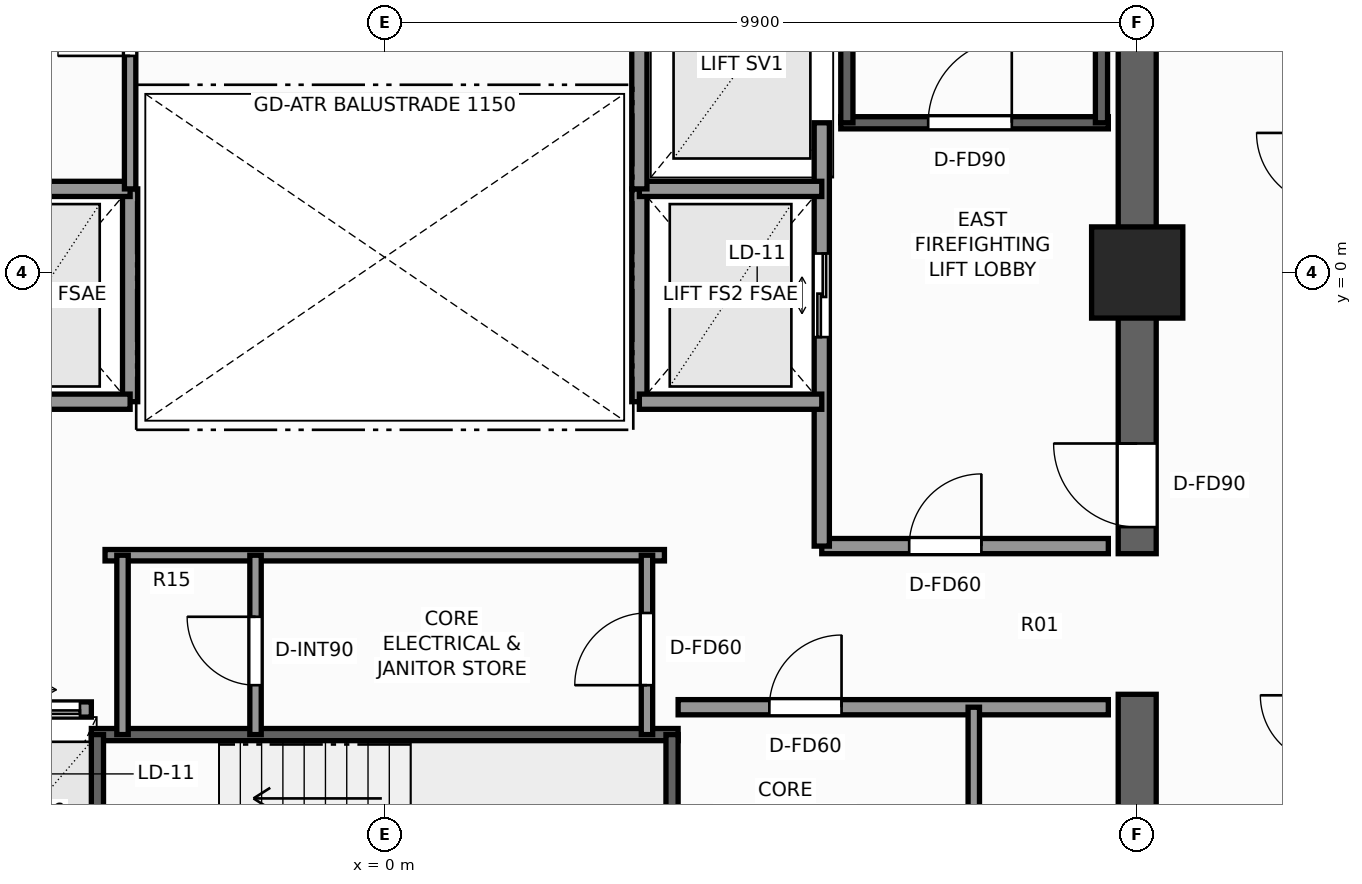
"""IFC4 building model, lengths in metres.
Left out: names, types, materials, properties, quantities, classifications, styles, units other than length and angle.
Written with IfcOpenShell. Run it as: python <this file> out.ifc"""

import sys

from ifc_helpers import new_model, si_unit, direction, frame, frame_2d, origin, origin_2d, place, context, subcontext, project, spatial, rectangle, extrude, element, fill, save


model = new_model("IFC4")
c1 = context("Model", 3, precision=1e-05, world=origin(), true_north=direction((0.0, 1.0)))
c2 = subcontext(c1, "Body", "Model", "MODEL_VIEW")
j1 = project(units=[si_unit("LENGTHUNIT", "METRE"), si_unit("PLANEANGLEUNIT", "RADIAN")], contexts=[c1])
p1 = place(None, origin())
s1 = spatial("IfcSite", under=j1, at=p1, CompositionType="ELEMENT")
p2 = place(p1, origin())
s2 = spatial("IfcBuilding", under=s1, at=p2, CompositionType="ELEMENT")
p3 = place(p2, frame((0.0, 0.0, 128.3)))
s3 = spatial("IfcBuildingStorey", under=s2, at=p3, CompositionType="ELEMENT", Elevation=128.3)
p4 = place(p3, frame((9.9, -9.65, 0.0), z_axis=(0.0, 0.0, 1.0), x_axis=(0.0, 1.0, 0.0)))
e1 = element("IfcWall", 1, at=p4, inside=s3, PredefinedType="SHEAR", context=c2, shape_type="SweptSolid", body=[
    extrude(rectangle(XDim=4.1, YDim=0.5, at=frame_2d((2.05, 0.0))), origin(), (0.0, 0.0, 1.0), 3.3),
])
p5 = place(p3, frame((9.9, -3.7, 0.0), z_axis=(0.0, 0.0, 1.0), x_axis=(0.0, 1.0, 0.0)))
e2 = element("IfcWall", 2, at=p5, inside=s3, PredefinedType="SHEAR", context=c2, shape_type="SweptSolid", body=[
    extrude(rectangle(XDim=13.35, YDim=0.5, at=frame_2d((6.675, 0.0))), origin(), (0.0, 0.0, 1.0), 3.3),
])
p6 = place(p5, frame((0.35, 0.0, 0.0)))
e3 = element("IfcOpeningElement", 3, at=p6, cuts=e2, PredefinedType="OPENING", context=c2, shape_type="SweptSolid", body=[
    extrude(rectangle(XDim=1.1, YDim=2.2, at=frame_2d((0.55, 1.1))), frame((0.0, 0.26, 0.0), z_axis=(0.0, -1.0, 0.0), x_axis=(1.0, 0.0, 0.0)), (0.0, 0.0, 1.0), 0.52),
])
p7 = place(p3, frame((9.9, 0.0, 0.0), z_axis=(0.0, 0.0, 1.0), x_axis=(1.0, 0.0, 0.0)))
e4 = element("IfcColumn", 4, at=p7, inside=s3, PredefinedType="COLUMN", context=c2, shape_type="SweptSolid", body=[
    extrude(rectangle(XDim=1.2, YDim=1.2, at=origin_2d()), origin(), (0.0, 0.0, 1.0), 3.3),
])
p8 = place(p3, frame((6.0, 1.97, 0.0), z_axis=(0.0, 0.0, 1.0), x_axis=(1.0, 0.0, 0.0)))
e5 = element("IfcWall", 5, at=p8, inside=s3, PredefinedType="SHEAR", context=c2, shape_type="SweptSolid", body=[
    extrude(rectangle(XDim=3.52, YDim=0.16, at=frame_2d((1.76, 0.0))), origin(), (0.0, 0.0, 1.0), 3.3),
])
p9 = place(p8, frame((1.15, 0.0, 0.0)))
e6 = element("IfcOpeningElement", 6, at=p9, cuts=e5, PredefinedType="OPENING", context=c2, shape_type="SweptSolid", body=[
    extrude(rectangle(XDim=1.1, YDim=2.2, at=frame_2d((0.55, 1.1))), frame((0.0, 0.09, 0.0), z_axis=(0.0, -1.0, 0.0), x_axis=(1.0, 0.0, 0.0)), (0.0, 0.0, 1.0), 0.18),
])
for number, where, z_axis, x_axis in (
    (7, (6.08, 1.97, 0.0), (0.0, 0.0, 1.0), (0.0, 1.0, 0.0)),
    (8, (9.43, 1.97, 0.0), (0.0, 0.0, 1.0), (0.0, 1.0, 0.0)),
):
    element("IfcWall", number, at=place(p3, frame(where, z_axis=z_axis, x_axis=x_axis)), inside=s3, PredefinedType="SHEAR", context=c2, shape_type="SweptSolid", body=[
        extrude(rectangle(XDim=7.56, YDim=0.16, at=frame_2d((3.78, 0.0))), origin(), (0.0, 0.0, 1.0), 3.3),
    ])
p10 = place(p3, frame((-3.86, -6.08, 0.0), z_axis=(0.0, 0.0, 1.0), x_axis=(1.0, 0.0, 0.0)))
e9 = element("IfcWall", 9, at=p10, inside=s3, PredefinedType="SHEAR", context=c2, shape_type="SweptSolid", body=[
    extrude(rectangle(XDim=7.72, YDim=0.16, at=frame_2d((3.86, 0.0))), origin(), (0.0, 0.0, 1.0), 3.3),
])
for number, where, z_axis, x_axis in (
    (10, (-3.78, -9.43, 0.0), (0.0, 0.0, 1.0), (0.0, 1.0, 0.0)),
    (11, (3.78, -9.43, 0.0), (0.0, 0.0, 1.0), (0.0, 1.0, 0.0)),
):
    element("IfcWall", number, at=place(p3, frame(where, z_axis=z_axis, x_axis=x_axis)), inside=s3, PredefinedType="SHEAR", context=c2, shape_type="SweptSolid", body=[
        extrude(rectangle(XDim=3.35, YDim=0.16, at=frame_2d((1.675, 0.0))), origin(), (0.0, 0.0, 1.0), 3.3),
    ])
p11 = place(p3, frame((-3.35, -1.7, 0.0), z_axis=(0.0, 0.0, 1.0), x_axis=(0.0, 1.0, 0.0)))
e12 = element("IfcWall", 12, at=p11, inside=s3, PredefinedType="SOLIDWALL", context=c2, shape_type="SweptSolid", body=[
    extrude(rectangle(XDim=2.8, YDim=0.2, at=frame_2d((1.4, 0.0))), origin(), (0.0, 0.0, 1.0), 2.735),
])
for number, where, z_axis, x_axis in (
    (13, (-5.75, -1.7, 0.0), (0.0, 0.0, 1.0), (1.0, 0.0, 0.0)),
    (14, (-5.75, 1.1, 0.0), (0.0, 0.0, 1.0), (1.0, 0.0, 0.0)),
):
    element("IfcWall", number, at=place(p3, frame(where, z_axis=z_axis, x_axis=x_axis)), inside=s3, PredefinedType="SOLIDWALL", context=c2, shape_type="SweptSolid", body=[
        extrude(rectangle(XDim=2.4, YDim=0.2, at=frame_2d((1.2, 0.0))), origin(), (0.0, 0.0, 1.0), 3.1),
    ])
p12 = place(p3, frame((5.75, -3.6, 0.0), z_axis=(0.0, 0.0, 1.0), x_axis=(1.0, 0.0, 0.0)))
e15 = element("IfcWall", 15, at=p12, inside=s3, PredefinedType="SOLIDWALL", context=c2, shape_type="SweptSolid", body=[
    extrude(rectangle(XDim=3.77, YDim=0.2, at=frame_2d((1.885, 0.0))), origin(), (0.0, 0.0, 1.0), 3.1),
])
p13 = place(p12, frame((1.15, 0.0, 0.0)))
e16 = element("IfcOpeningElement", 16, at=p13, cuts=e15, PredefinedType="OPENING", context=c2, shape_type="SweptSolid", body=[
    extrude(rectangle(XDim=0.95, YDim=2.06, at=frame_2d((0.475, 1.03))), frame((0.0, 0.11, 0.0), z_axis=(0.0, -1.0, 0.0), x_axis=(1.0, 0.0, 0.0)), (0.0, 0.0, 1.0), 0.22),
])
p14 = place(p3, frame((5.75, -3.6, 0.0), z_axis=(0.0, 0.0, 1.0), x_axis=(0.0, 1.0, 0.0)))
e17 = element("IfcWall", 17, at=p14, inside=s3, PredefinedType="SOLIDWALL", context=c2, shape_type="SweptSolid", body=[
    extrude(rectangle(XDim=5.57, YDim=0.2, at=frame_2d((2.785, 0.0))), origin(), (0.0, 0.0, 1.0), 2.735),
])
p15 = place(p14, frame((2.75, 0.0, 0.0)))
e18 = element("IfcOpeningElement", 18, at=p15, cuts=e17, PredefinedType="OPENING", context=c2, shape_type="SweptSolid", body=[
    extrude(rectangle(XDim=1.1, YDim=2.2, at=frame_2d((0.55, 1.1))), frame((0.0, 0.11, 0.0), z_axis=(0.0, -1.0, 0.0), x_axis=(1.0, 0.0, 0.0)), (0.0, 0.0, 1.0), 0.22),
])
p16 = place(p3, frame((3.35, -1.7, 0.0), z_axis=(0.0, 0.0, 1.0), x_axis=(0.0, 1.0, 0.0)))
e19 = element("IfcWall", 19, at=p16, inside=s3, PredefinedType="SOLIDWALL", context=c2, shape_type="SweptSolid", body=[
    extrude(rectangle(XDim=2.8, YDim=0.2, at=frame_2d((1.4, 0.0))), origin(), (0.0, 0.0, 1.0), 2.735),
])
for number, where, z_axis, x_axis in (
    (20, (3.35, -1.7, 0.0), (0.0, 0.0, 1.0), (1.0, 0.0, 0.0)),
    (21, (3.35, 1.1, 0.0), (0.0, 0.0, 1.0), (1.0, 0.0, 0.0)),
):
    element("IfcWall", number, at=place(p3, frame(where, z_axis=z_axis, x_axis=x_axis)), inside=s3, PredefinedType="SOLIDWALL", context=c2, shape_type="SweptSolid", body=[
        extrude(rectangle(XDim=2.4, YDim=0.2, at=frame_2d((1.2, 0.0))), origin(), (0.0, 0.0, 1.0), 3.1),
    ])
p17 = place(p3, frame((3.35, 1.1, 0.0), z_axis=(0.0, 0.0, 1.0), x_axis=(0.0, 1.0, 0.0)))
e22 = element("IfcWall", 22, at=p17, inside=s3, PredefinedType="SOLIDWALL", context=c2, shape_type="SweptSolid", body=[
    extrude(rectangle(XDim=3.2, YDim=0.2, at=frame_2d((1.6, 0.0))), origin(), (0.0, 0.0, 1.0), 2.735),
])
p18 = place(p3, frame((-9.52, -5.75, 0.0), z_axis=(0.0, 0.0, 1.0), x_axis=(1.0, 0.0, 0.0)))
e23 = element("IfcWall", 23, at=p18, inside=s3, PredefinedType="SOLIDWALL", context=c2, shape_type="SweptSolid", body=[
    extrude(rectangle(XDim=5.66, YDim=0.2, at=frame_2d((2.83, 0.0))), origin(), (0.0, 0.0, 1.0), 3.1),
])
p19 = place(p18, frame((0.55, 0.0, 0.0)))
e24 = element("IfcOpeningElement", 24, at=p19, cuts=e23, PredefinedType="OPENING", context=c2, shape_type="SweptSolid", body=[
    extrude(rectangle(XDim=1.1, YDim=2.2, at=frame_2d((0.55, 1.1))), frame((0.0, 0.11, 0.0), z_axis=(0.0, -1.0, 0.0), x_axis=(1.0, 0.0, 0.0)), (0.0, 0.0, 1.0), 0.22),
])
p20 = place(p18, frame((2.48, 0.0, 0.0)))
e25 = element("IfcOpeningElement", 25, at=p20, cuts=e23, PredefinedType="OPENING", context=c2, shape_type="SweptSolid", body=[
    extrude(rectangle(XDim=1.1, YDim=2.2, at=frame_2d((0.55, 1.1))), frame((0.0, 0.11, 0.0), z_axis=(0.0, -1.0, 0.0), x_axis=(1.0, 0.0, 0.0)), (0.0, 0.0, 1.0), 0.22),
])
p21 = place(p18, frame((4.41, 0.0, 0.0)))
e26 = element("IfcOpeningElement", 26, at=p21, cuts=e23, PredefinedType="OPENING", context=c2, shape_type="SweptSolid", body=[
    extrude(rectangle(XDim=1.1, YDim=2.2, at=frame_2d((0.55, 1.1))), frame((0.0, 0.11, 0.0), z_axis=(0.0, -1.0, 0.0), x_axis=(1.0, 0.0, 0.0)), (0.0, 0.0, 1.0), 0.22),
])
p22 = place(p3, frame((3.86, -5.72, 0.0), z_axis=(0.0, 0.0, 1.0), x_axis=(1.0, 0.0, 0.0)))
e27 = element("IfcWall", 27, at=p22, inside=s3, PredefinedType="SOLIDWALL", context=c2, shape_type="SweptSolid", body=[
    extrude(rectangle(XDim=5.66, YDim=0.2, at=frame_2d((2.83, 0.0))), origin(), (0.0, 0.0, 1.0), 3.1),
])
p23 = place(p22, frame((1.2, 0.0, 0.0)))
e28 = element("IfcOpeningElement", 28, at=p23, cuts=e27, PredefinedType="OPENING", context=c2, shape_type="SweptSolid", body=[
    extrude(rectangle(XDim=0.95, YDim=2.06, at=frame_2d((0.475, 1.03))), frame((0.0, 0.11, 0.0), z_axis=(0.0, -1.0, 0.0), x_axis=(1.0, 0.0, 0.0)), (0.0, 0.0, 1.0), 0.22),
])
p24 = place(p3, frame((7.75, -9.52, 0.0), z_axis=(0.0, 0.0, 1.0), x_axis=(0.0, 1.0, 0.0)))
e29 = element("IfcWall", 29, at=p24, inside=s3, PredefinedType="PARTITIONING", context=c2, shape_type="SweptSolid", body=[
    extrude(rectangle(XDim=3.8, YDim=0.15, at=frame_2d((1.9, 0.0))), origin(), (0.0, 0.0, 1.0), 3.1),
])
p25 = place(p24, frame((0.9, 0.0, 0.0)))
e30 = element("IfcOpeningElement", 30, at=p25, cuts=e29, PredefinedType="OPENING", context=c2, shape_type="SweptSolid", body=[
    extrude(rectangle(XDim=0.85, YDim=2.03, at=frame_2d((0.425, 1.015))), frame((0.0, 0.085, 0.0), z_axis=(0.0, -1.0, 0.0), x_axis=(1.0, 0.0, 0.0)), (0.0, 0.0, 1.0), 0.17),
])
p26 = place(p3, frame((-3.68, -3.72, 0.0), z_axis=(0.0, 0.0, 1.0), x_axis=(1.0, 0.0, 0.0)))
e31 = element("IfcWall", 31, at=p26, inside=s3, PredefinedType="PARTITIONING", context=c2, shape_type="SweptSolid", body=[
    extrude(rectangle(XDim=7.36, YDim=0.15, at=frame_2d((3.68, 0.0))), origin(), (0.0, 0.0, 1.0), 3.1),
])
p27 = place(p3, frame((3.45, -6.08, 0.0), z_axis=(0.0, 0.0, 1.0), x_axis=(0.0, 1.0, 0.0)))
e32 = element("IfcWall", 32, at=p27, inside=s3, PredefinedType="PARTITIONING", context=c2, shape_type="SweptSolid", body=[
    extrude(rectangle(XDim=2.36, YDim=0.15, at=frame_2d((1.18, 0.0))), origin(), (0.0, 0.0, 1.0), 3.1),
])
p28 = place(p27, frame((0.65, 0.0, 0.0)))
e33 = element("IfcOpeningElement", 33, at=p28, cuts=e32, PredefinedType="OPENING", context=c2, shape_type="SweptSolid", body=[
    extrude(rectangle(XDim=0.95, YDim=2.06, at=frame_2d((0.475, 1.03))), frame((0.0, 0.085, 0.0), z_axis=(0.0, -1.0, 0.0), x_axis=(1.0, 0.0, 0.0)), (0.0, 0.0, 1.0), 0.17),
])
p29 = place(p3, frame((-3.45, -6.08, 0.0), z_axis=(0.0, 0.0, 1.0), x_axis=(0.0, 1.0, 0.0)))
e34 = element("IfcWall", 34, at=p29, inside=s3, PredefinedType="PARTITIONING", context=c2, shape_type="SweptSolid", body=[
    extrude(rectangle(XDim=2.36, YDim=0.15, at=frame_2d((1.18, 0.0))), origin(), (0.0, 0.0, 1.0), 3.1),
])
p30 = place(p3, frame((-1.7, -6.08, 0.0), z_axis=(0.0, 0.0, 1.0), x_axis=(0.0, 1.0, 0.0)))
e35 = element("IfcWall", 35, at=p30, inside=s3, PredefinedType="PARTITIONING", context=c2, shape_type="SweptSolid", body=[
    extrude(rectangle(XDim=2.36, YDim=0.15, at=frame_2d((1.18, 0.0))), origin(), (0.0, 0.0, 1.0), 3.1),
])
p31 = place(p30, frame((0.65, 0.0, 0.0)))
e36 = element("IfcOpeningElement", 36, at=p31, cuts=e35, PredefinedType="OPENING", context=c2, shape_type="SweptSolid", body=[
    extrude(rectangle(XDim=0.9, YDim=2.06, at=frame_2d((0.45, 1.03))), frame((0.0, 0.085, 0.0), z_axis=(0.0, -1.0, 0.0), x_axis=(1.0, 0.0, 0.0)), (0.0, 0.0, 1.0), 0.17),
])
p32 = place(p3, frame((-3.35, 1.1, 0.0), z_axis=(0.0, 0.0, 1.0), x_axis=(0.0, 1.0, 0.0)))
e37 = element("IfcWall", 37, at=p32, inside=s3, PredefinedType="PARTITIONING", context=c2, shape_type="SweptSolid", body=[
    extrude(rectangle(XDim=3.2, YDim=0.15, at=frame_2d((1.6, 0.0))), origin(), (0.0, 0.0, 1.0), 2.735),
])
p33 = place(p32, frame((1.75, 0.0, 0.0)))
e38 = element("IfcOpeningElement", 38, at=p33, cuts=e37, PredefinedType="OPENING", context=c2, shape_type="SweptSolid", body=[
    extrude(rectangle(XDim=0.95, YDim=2.06, at=frame_2d((0.475, 1.03))), frame((0.0, 0.085, 0.0), z_axis=(0.0, -1.0, 0.0), x_axis=(1.0, 0.0, 0.0)), (0.0, 0.0, 1.0), 0.17),
])
p34 = place(p9, origin())
e39 = element("IfcDoor", 39, at=p34, inside=s3, OperationType="SINGLE_SWING_RIGHT", PredefinedType="DOOR", context=c2, shape_type="SweptSolid", body=[
    extrude(rectangle(XDim=1.1, YDim=2.2, at=frame_2d((0.55, 1.1))), frame((0.0, 0.025, 0.0), z_axis=(0.0, -1.0, 0.0), x_axis=(1.0, 0.0, 0.0)), (0.0, 0.0, 1.0), 0.05),
])
fill(e6, e39)
p35 = place(p6, origin())
e40 = element("IfcDoor", 40, at=p35, inside=s3, OperationType="SINGLE_SWING_RIGHT", PredefinedType="DOOR", context=c2, shape_type="SweptSolid", body=[
    extrude(rectangle(XDim=1.1, YDim=2.2, at=frame_2d((0.55, 1.1))), frame((0.0, 0.025, 0.0), z_axis=(0.0, -1.0, 0.0), x_axis=(1.0, 0.0, 0.0)), (0.0, 0.0, 1.0), 0.05),
])
fill(e3, e40)
p36 = place(p15, origin())
e41 = element("IfcDoor", 41, at=p36, inside=s3, OperationType="DOUBLE_DOOR_SLIDING", PredefinedType="DOOR", context=c2, shape_type="SweptSolid", body=[
    extrude(rectangle(XDim=1.1, YDim=2.2, at=frame_2d((0.55, 1.1))), frame((0.0, 0.025, 0.0), z_axis=(0.0, -1.0, 0.0), x_axis=(1.0, 0.0, 0.0)), (0.0, 0.0, 1.0), 0.05),
])
fill(e18, e41)
p37 = place(p21, origin())
e42 = element("IfcDoor", 42, at=p37, inside=s3, OperationType="DOUBLE_DOOR_SLIDING", PredefinedType="DOOR", context=c2, shape_type="SweptSolid", body=[
    extrude(rectangle(XDim=1.1, YDim=2.2, at=frame_2d((0.55, 1.1))), frame((0.0, 0.025, 0.0), z_axis=(0.0, -1.0, 0.0), x_axis=(1.0, 0.0, 0.0)), (0.0, 0.0, 1.0), 0.05),
])
fill(e26, e42)
p38 = place(p23, origin())
e43 = element("IfcDoor", 43, at=p38, inside=s3, OperationType="SINGLE_SWING_RIGHT", PredefinedType="DOOR", context=c2, shape_type="SweptSolid", body=[
    extrude(rectangle(XDim=0.95, YDim=2.06, at=frame_2d((0.475, 1.03))), frame((0.0, 0.025, 0.0), z_axis=(0.0, -1.0, 0.0), x_axis=(1.0, 0.0, 0.0)), (0.0, 0.0, 1.0), 0.05),
])
fill(e28, e43)
p39 = place(p13, origin())
e44 = element("IfcDoor", 44, at=p39, inside=s3, OperationType="SINGLE_SWING_RIGHT", PredefinedType="DOOR", context=c2, shape_type="SweptSolid", body=[
    extrude(rectangle(XDim=0.95, YDim=2.06, at=frame_2d((0.475, 1.03))), frame((0.0, 0.025, 0.0), z_axis=(0.0, -1.0, 0.0), x_axis=(1.0, 0.0, 0.0)), (0.0, 0.0, 1.0), 0.05),
])
fill(e16, e44)
p40 = place(p28, origin())
e45 = element("IfcDoor", 45, at=p40, inside=s3, OperationType="SINGLE_SWING_LEFT", PredefinedType="DOOR", context=c2, shape_type="SweptSolid", body=[
    extrude(rectangle(XDim=0.95, YDim=2.06, at=frame_2d((0.475, 1.03))), frame((0.0, 0.025, 0.0), z_axis=(0.0, -1.0, 0.0), x_axis=(1.0, 0.0, 0.0)), (0.0, 0.0, 1.0), 0.05),
])
fill(e33, e45)
p41 = place(p31, origin())
e46 = element("IfcDoor", 46, at=p41, inside=s3, OperationType="SINGLE_SWING_RIGHT", PredefinedType="DOOR", context=c2, shape_type="SweptSolid", body=[
    extrude(rectangle(XDim=0.9, YDim=2.06, at=frame_2d((0.45, 1.03))), frame((0.0, 0.025, 0.0), z_axis=(0.0, -1.0, 0.0), x_axis=(1.0, 0.0, 0.0)), (0.0, 0.0, 1.0), 0.05),
])
fill(e36, e46)
p42 = place(p33, origin())
e47 = element("IfcDoor", 47, at=p42, inside=s3, OperationType="SINGLE_SWING_LEFT", PredefinedType="DOOR", context=c2, shape_type="SweptSolid", body=[
    extrude(rectangle(XDim=0.95, YDim=2.06, at=frame_2d((0.475, 1.03))), frame((0.0, 0.025, 0.0), z_axis=(0.0, -1.0, 0.0), x_axis=(1.0, 0.0, 0.0)), (0.0, 0.0, 1.0), 0.05),
])
fill(e38, e47)
save(model, sys.argv[1])
